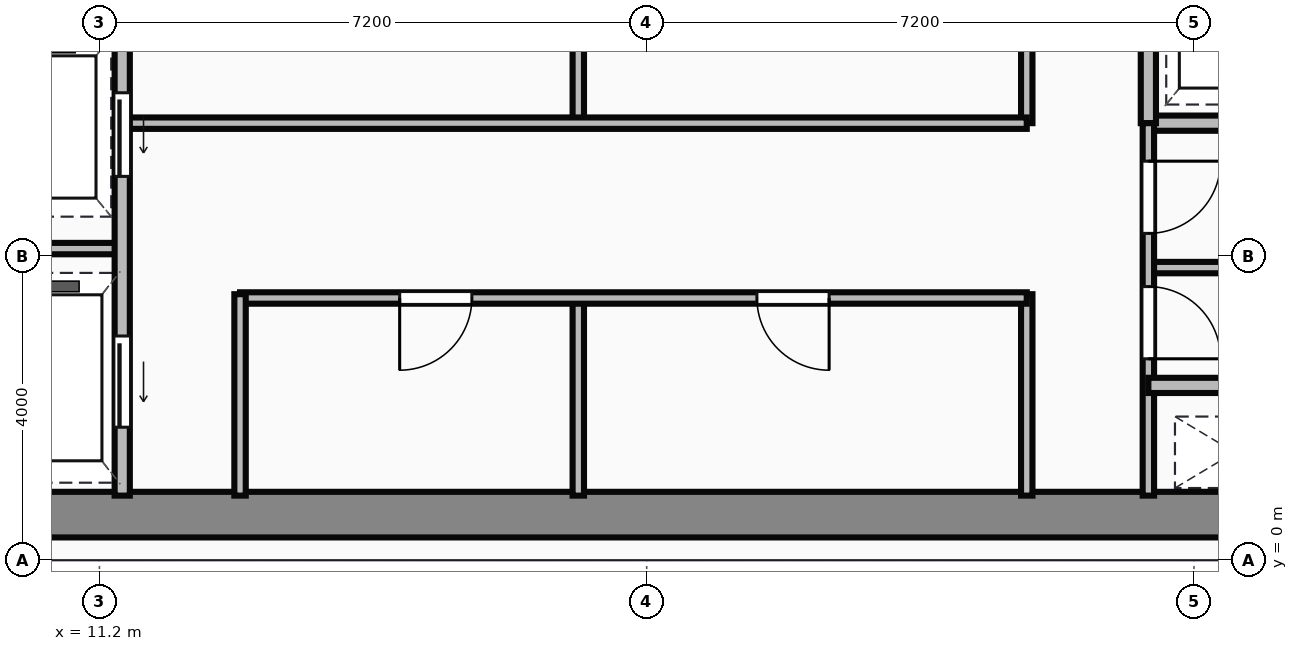
"""IFC4 building model, lengths in metres.
Left out: names, types, materials, properties, quantities, classifications, styles, units other than length and angle.
Written with IfcOpenShell. Run it as: python <this file> out.ifc"""

import sys

from ifc_helpers import new_model, si_unit, direction, frame, frame_2d, origin, place, context, subcontext, project, spatial, rectangle, extrude, source, transform, mapped, element, fill, save


model = new_model("IFC4")
c1 = context("Model", 3, precision=1e-05, world=origin(), true_north=direction((0.0, 1.0)))
c2 = subcontext(c1, "Body", "Model", "MODEL_VIEW")
j1 = project(units=[si_unit("LENGTHUNIT", "METRE"), si_unit("PLANEANGLEUNIT", "RADIAN")], contexts=[c1])
p1 = place(None, origin())
s1 = spatial("IfcSite", under=j1, at=p1, CompositionType="ELEMENT")
p2 = place(p1, origin())
s2 = spatial("IfcBuilding", under=s1, at=p2, CompositionType="ELEMENT")
p3 = place(p2, frame((0.0, 0.0, 251.5)))
s3 = spatial("IfcBuildingStorey", under=s2, at=p3, CompositionType="ELEMENT", Elevation=251.5)
m1 = source(origin(), c2, "Body", "SweptSolid", [
    extrude(rectangle(XDim=29.5, YDim=0.6, at=frame_2d((14.75, 0.0))), origin(), (0.0, 0.0, 1.0), 3.65),
])
p4 = place(p3, frame((4.5, 0.6, 0.0), z_axis=(0.0, 0.0, 1.0), x_axis=(1.0, 0.0, 0.0)))
e1 = element("IfcWall", 1, at=p4, inside=s3, PredefinedType="SHEAR", context=c2, shape_type="MappedRepresentation", body=[
    mapped(m1, transform((0.0, 0.0, 0.0))),
])
m2 = source(origin(), c2, "Body", "SweptSolid", [
    extrude(rectangle(XDim=9.6, YDim=0.2, at=frame_2d((4.8, 0.0))), origin(), (0.0, 0.0, 1.0), 3.4),
])
p5 = place(p3, frame((11.5, 0.85, 0.0), z_axis=(0.0, 0.0, 1.0), x_axis=(0.0, 1.0, 0.0)))
e2 = element("IfcWall", 2, at=p5, inside=s3, PredefinedType="PARTITIONING", context=c2, shape_type="MappedRepresentation", body=[
    mapped(m2, transform((0.0, 0.0, 0.0))),
])
p6 = place(p5, frame((4.2, 0.0, 0.0)))
e3 = element("IfcOpeningElement", 3, at=p6, cuts=e2, PredefinedType="OPENING", context=c2, shape_type="SweptSolid", body=[
    extrude(rectangle(XDim=1.1, YDim=2.15, at=frame_2d((0.55, 1.075))), frame((0.0, 0.11, 0.0), z_axis=(0.0, -1.0, 0.0), x_axis=(1.0, 0.0, 0.0)), (0.0, 0.0, 1.0), 0.22),
])
p7 = place(p5, frame((0.9, 0.0, 0.0)))
e4 = element("IfcOpeningElement", 4, at=p7, cuts=e2, PredefinedType="OPENING", context=c2, shape_type="SweptSolid", body=[
    extrude(rectangle(XDim=1.2, YDim=2.15, at=frame_2d((0.6, 1.075))), frame((0.0, 0.11, 0.0), z_axis=(0.0, -1.0, 0.0), x_axis=(1.0, 0.0, 0.0)), (0.0, 0.0, 1.0), 0.22),
])
m3 = source(origin(), c2, "Body", "SweptSolid", [
    extrude(rectangle(XDim=2.4, YDim=0.15, at=frame_2d((1.2, 0.0))), origin(), (0.0, 0.0, 1.0), 3.4),
])
p8 = place(p3, frame((9.1, 4.1, 0.0), z_axis=(0.0, 0.0, 1.0), x_axis=(1.0, 0.0, 0.0)))
e5 = element("IfcWall", 5, at=p8, inside=s3, PredefinedType="PARTITIONING", context=c2, shape_type="MappedRepresentation", body=[
    mapped(m3, transform((0.0, 0.0, 0.0))),
])
m4 = source(origin(), c2, "Body", "SweptSolid", [
    extrude(rectangle(XDim=2.65, YDim=0.15, at=frame_2d((1.325, 0.0))), origin(), (0.0, 0.0, 1.0), 3.4),
])
p9 = place(p3, frame((13.05, 0.85, 0.0), z_axis=(0.0, 0.0, 1.0), x_axis=(0.0, 1.0, 0.0)))
e6 = element("IfcWall", 6, at=p9, inside=s3, PredefinedType="PARTITIONING", context=c2, shape_type="MappedRepresentation", body=[
    mapped(m4, transform((0.0, 0.0, 0.0))),
])
m5 = source(origin(), c2, "Body", "SweptSolid", [
    extrude(rectangle(XDim=10.35, YDim=0.15, at=frame_2d((5.175, 0.0))), origin(), (0.0, 0.0, 1.0), 3.4),
])
p10 = place(p3, frame((13.05, 3.45, 0.0), z_axis=(0.0, 0.0, 1.0), x_axis=(1.0, 0.0, 0.0)))
e7 = element("IfcWall", 7, at=p10, inside=s3, PredefinedType="PARTITIONING", context=c2, shape_type="MappedRepresentation", body=[
    mapped(m5, transform((0.0, 0.0, 0.0))),
])
p11 = place(p10, frame((2.1, 0.0, 0.0)))
e8 = element("IfcOpeningElement", 8, at=p11, cuts=e7, PredefinedType="OPENING", context=c2, shape_type="SweptSolid", body=[
    extrude(rectangle(XDim=0.95, YDim=2.15, at=frame_2d((0.475, 1.075))), frame((0.0, 0.085, 0.0), z_axis=(0.0, -1.0, 0.0), x_axis=(1.0, 0.0, 0.0)), (0.0, 0.0, 1.0), 0.17),
])
p12 = place(p10, frame((6.8, 0.0, 0.0)))
e9 = element("IfcOpeningElement", 9, at=p12, cuts=e7, PredefinedType="OPENING", context=c2, shape_type="SweptSolid", body=[
    extrude(rectangle(XDim=0.95, YDim=2.15, at=frame_2d((0.475, 1.075))), frame((0.0, 0.085, 0.0), z_axis=(0.0, -1.0, 0.0), x_axis=(1.0, 0.0, 0.0)), (0.0, 0.0, 1.0), 0.17),
])
p13 = place(p3, frame((23.4, 0.85, 0.0), z_axis=(0.0, 0.0, 1.0), x_axis=(0.0, 1.0, 0.0)))
e10 = element("IfcWall", 10, at=p13, inside=s3, PredefinedType="PARTITIONING", context=c2, shape_type="MappedRepresentation", body=[
    mapped(m4, transform((0.0, 0.0, 0.0))),
])
m6 = source(origin(), c2, "Body", "SweptSolid", [
    extrude(rectangle(XDim=2.6, YDim=0.15, at=frame_2d((1.3, 0.0))), origin(), (0.0, 0.0, 1.0), 3.4),
])
p14 = place(p3, frame((17.5, 0.85, 0.0), z_axis=(0.0, 0.0, 1.0), x_axis=(0.0, 1.0, 0.0)))
e11 = element("IfcWall", 11, at=p14, inside=s3, PredefinedType="PARTITIONING", context=c2, shape_type="MappedRepresentation", body=[
    mapped(m6, transform((0.0, 0.0, 0.0))),
])
m7 = source(origin(), c2, "Body", "SweptSolid", [
    extrude(rectangle(XDim=11.85, YDim=0.15, at=frame_2d((5.925, 0.0))), origin(), (0.0, 0.0, 1.0), 3.4),
])
p15 = place(p3, frame((11.55, 5.75, 0.0), z_axis=(0.0, 0.0, 1.0), x_axis=(1.0, 0.0, 0.0)))
e12 = element("IfcWall", 12, at=p15, inside=s3, PredefinedType="PARTITIONING", context=c2, shape_type="MappedRepresentation", body=[
    mapped(m7, transform((0.0, 0.0, 0.0))),
])
m8 = source(origin(), c2, "Body", "SweptSolid", [
    extrude(rectangle(XDim=2.6, YDim=0.15, at=frame_2d((1.3, 0.0))), origin(), (0.0, 0.0, 1.0), 3.4),
])
p16 = place(p3, frame((23.4, 5.75, 0.0), z_axis=(0.0, 0.0, 1.0), x_axis=(0.0, 1.0, 0.0)))
e13 = element("IfcWall", 13, at=p16, inside=s3, PredefinedType="PARTITIONING", context=c2, shape_type="MappedRepresentation", body=[
    mapped(m8, transform((0.0, 0.0, 0.0))),
])
m9 = source(origin(), c2, "Body", "SweptSolid", [
    extrude(rectangle(XDim=2.5, YDim=0.15, at=frame_2d((1.25, 0.0))), origin(), (0.0, 0.0, 1.0), 3.4),
])
p17 = place(p3, frame((17.5, 5.8, 0.0), z_axis=(0.0, 0.0, 1.0), x_axis=(0.0, 1.0, 0.0)))
e14 = element("IfcWall", 14, at=p17, inside=s3, PredefinedType="PARTITIONING", context=c2, shape_type="MappedRepresentation", body=[
    mapped(m9, transform((0.0, 0.0, 0.0))),
])
m10 = source(origin(), c2, "Body", "SweptSolid", [
    extrude(rectangle(XDim=4.55, YDim=0.2, at=frame_2d((2.275, 0.0))), origin(), (0.0, 0.0, 1.0), 3.4),
])
p18 = place(p3, frame((25.0, 5.75, 0.0), z_axis=(0.0, 0.0, 1.0), x_axis=(1.0, 0.0, 0.0)))
e15 = element("IfcWall", 15, at=p18, inside=s3, PredefinedType="PARTITIONING", context=c2, shape_type="MappedRepresentation", body=[
    mapped(m10, transform((0.0, 0.0, 0.0))),
])
m11 = source(origin(), c2, "Body", "SweptSolid", [
    extrude(rectangle(XDim=2.6, YDim=0.2, at=frame_2d((1.3, 0.0))), origin(), (0.0, 0.0, 1.0), 3.4),
])
p19 = place(p3, frame((25.0, 5.75, 0.0), z_axis=(0.0, 0.0, 1.0), x_axis=(0.0, 1.0, 0.0)))
e16 = element("IfcWall", 16, at=p19, inside=s3, PredefinedType="PARTITIONING", context=c2, shape_type="MappedRepresentation", body=[
    mapped(m11, transform((0.0, 0.0, 0.0))),
])
m12 = source(origin(), c2, "Body", "SweptSolid", [
    extrude(rectangle(XDim=4.9, YDim=0.15, at=frame_2d((2.45, 0.0))), origin(), (0.0, 0.0, 1.0), 3.4),
])
p20 = place(p3, frame((25.0, 0.85, 0.0), z_axis=(0.0, 0.0, 1.0), x_axis=(0.0, 1.0, 0.0)))
e17 = element("IfcWall", 17, at=p20, inside=s3, PredefinedType="PARTITIONING", context=c2, shape_type="MappedRepresentation", body=[
    mapped(m12, transform((0.0, 0.0, 0.0))),
])
p21 = place(p20, frame((1.8, 0.0, 0.0)))
e18 = element("IfcOpeningElement", 18, at=p21, cuts=e17, PredefinedType="OPENING", context=c2, shape_type="SweptSolid", body=[
    extrude(rectangle(XDim=0.95, YDim=2.15, at=frame_2d((0.475, 1.075))), frame((0.0, 0.085, 0.0), z_axis=(0.0, -1.0, 0.0), x_axis=(1.0, 0.0, 0.0)), (0.0, 0.0, 1.0), 0.17),
])
p22 = place(p20, frame((3.45, 0.0, 0.0)))
e19 = element("IfcOpeningElement", 19, at=p22, cuts=e17, PredefinedType="OPENING", context=c2, shape_type="SweptSolid", body=[
    extrude(rectangle(XDim=0.95, YDim=2.15, at=frame_2d((0.475, 1.075))), frame((0.0, 0.085, 0.0), z_axis=(0.0, -1.0, 0.0), x_axis=(1.0, 0.0, 0.0)), (0.0, 0.0, 1.0), 0.17),
])
m13 = source(origin(), c2, "Body", "SweptSolid", [
    extrude(rectangle(XDim=2.4, YDim=0.2, at=frame_2d((1.2, 0.0))), origin(), (0.0, 0.0, 1.0), 3.4),
])
p23 = place(p3, frame((25.0, 2.3, 0.0), z_axis=(0.0, 0.0, 1.0), x_axis=(1.0, 0.0, 0.0)))
e20 = element("IfcWall", 20, at=p23, inside=s3, PredefinedType="PARTITIONING", context=c2, shape_type="MappedRepresentation", body=[
    mapped(m13, transform((0.0, 0.0, 0.0))),
])
m14 = source(origin(), c2, "Body", "SweptSolid", [
    extrude(rectangle(XDim=4.55, YDim=0.15, at=frame_2d((2.275, 0.0))), origin(), (0.0, 0.0, 1.0), 3.4),
])
p24 = place(p3, frame((25.0, 3.85, 0.0), z_axis=(0.0, 0.0, 1.0), x_axis=(1.0, 0.0, 0.0)))
e21 = element("IfcWall", 21, at=p24, inside=s3, PredefinedType="PARTITIONING", context=c2, shape_type="MappedRepresentation", body=[
    mapped(m14, transform((0.0, 0.0, 0.0))),
])
m15 = source(origin(), c2, "Body", "SweptSolid", [
    extrude(rectangle(XDim=1.1, YDim=2.15, at=frame_2d((0.55, 1.075))), frame((0.0, 0.025, 0.0), z_axis=(0.0, -1.0, 0.0), x_axis=(1.0, 0.0, 0.0)), (0.0, 0.0, 1.0), 0.05),
])
p25 = place(p6, frame((1.1, 0.0, 0.0), z_axis=(0.0, 0.0, 1.0), x_axis=(-1.0, 0.0, 0.0)))
e22 = element("IfcDoor", 22, at=p25, inside=s3, OperationType="SLIDING_TO_LEFT", PredefinedType="DOOR", context=c2, shape_type="MappedRepresentation", body=[
    mapped(m15, transform((0.0, 0.0, 0.0))),
])
fill(e3, e22)
m16 = source(origin(), c2, "Body", "SweptSolid", [
    extrude(rectangle(XDim=1.2, YDim=2.15, at=frame_2d((0.6, 1.075))), frame((0.0, 0.025, 0.0), z_axis=(0.0, -1.0, 0.0), x_axis=(1.0, 0.0, 0.0)), (0.0, 0.0, 1.0), 0.05),
])
p26 = place(p7, frame((1.2, 0.0, 0.0), z_axis=(0.0, 0.0, 1.0), x_axis=(-1.0, 0.0, 0.0)))
e23 = element("IfcDoor", 23, at=p26, inside=s3, OperationType="SLIDING_TO_LEFT", PredefinedType="DOOR", context=c2, shape_type="MappedRepresentation", body=[
    mapped(m16, transform((0.0, 0.0, 0.0))),
])
fill(e4, e23)
m17 = source(origin(), c2, "Body", "SweptSolid", [
    extrude(rectangle(XDim=0.95, YDim=2.15, at=frame_2d((0.475, 1.075))), frame((0.0, 0.025, 0.0), z_axis=(0.0, -1.0, 0.0), x_axis=(1.0, 0.0, 0.0)), (0.0, 0.0, 1.0), 0.05),
])
p27 = place(p11, origin())
e24 = element("IfcDoor", 24, at=p27, inside=s3, OperationType="SINGLE_SWING_LEFT", PredefinedType="DOOR", context=c2, shape_type="MappedRepresentation", body=[
    mapped(m17, transform((0.0, 0.0, 0.0))),
])
fill(e8, e24)
p28 = place(p12, origin())
e25 = element("IfcDoor", 25, at=p28, inside=s3, OperationType="SINGLE_SWING_RIGHT", PredefinedType="DOOR", context=c2, shape_type="MappedRepresentation", body=[
    mapped(m17, transform((0.0, 0.0, 0.0))),
])
fill(e9, e25)
p29 = place(p21, origin())
e26 = element("IfcDoor", 26, at=p29, inside=s3, OperationType="SINGLE_SWING_LEFT", PredefinedType="DOOR", context=c2, shape_type="MappedRepresentation", body=[
    mapped(m17, transform((0.0, 0.0, 0.0))),
])
fill(e18, e26)
p30 = place(p22, origin())
e27 = element("IfcDoor", 27, at=p30, inside=s3, OperationType="SINGLE_SWING_RIGHT", PredefinedType="DOOR", context=c2, shape_type="MappedRepresentation", body=[
    mapped(m17, transform((0.0, 0.0, 0.0))),
])
fill(e19, e27)
save(model, sys.argv[1])
